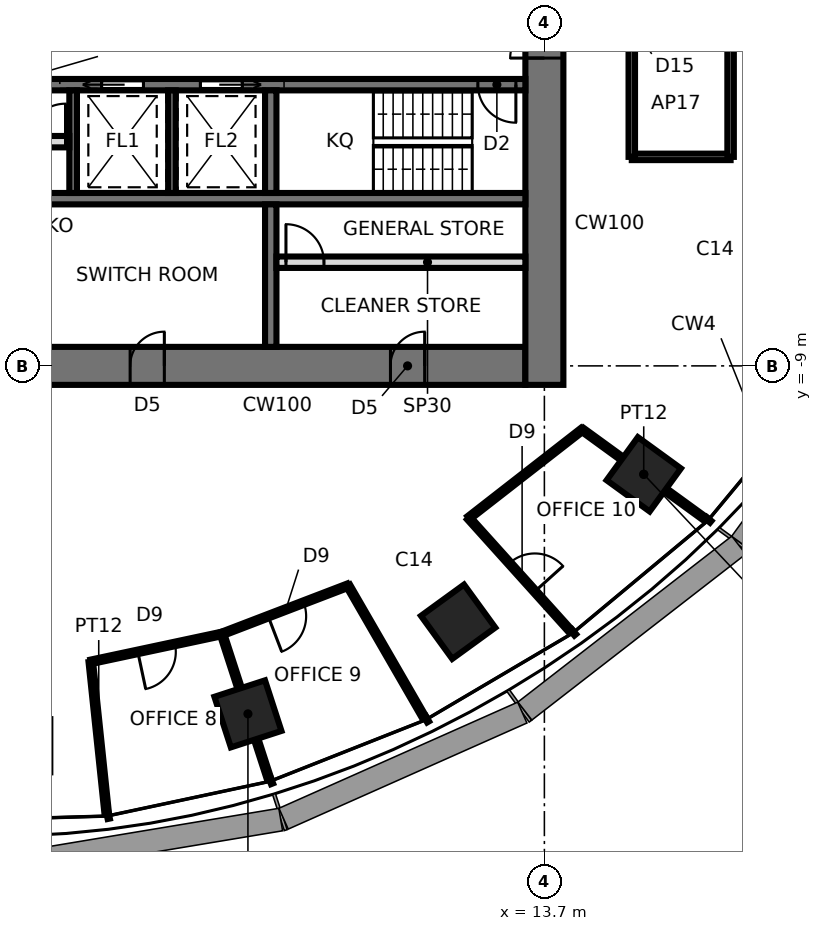
"""IFC4 building model, lengths in metres.
Left out: names, types, materials, properties, quantities, classifications, styles, units other than length and angle.
Written with IfcOpenShell. Run it as: python <this file> out.ifc"""

import sys

from ifc_helpers import new_model, si_unit, direction, frame, frame_2d, origin, origin_2d, place, context, subcontext, project, spatial, rectangle, extrude, element, fill, save


model = new_model("IFC4")
c1 = context("Model", 3, precision=1e-05, world=origin(), true_north=direction((0.0, 1.0)))
c2 = subcontext(c1, "Body", "Model", "MODEL_VIEW")
j1 = project(units=[si_unit("LENGTHUNIT", "METRE"), si_unit("PLANEANGLEUNIT", "RADIAN")], contexts=[c1])
p1 = place(None, origin())
s1 = spatial("IfcSite", under=j1, at=p1, CompositionType="ELEMENT")
p2 = place(p1, origin())
s2 = spatial("IfcBuilding", under=s1, at=p2, CompositionType="ELEMENT")
p3 = place(p2, frame((0.0, 0.0, 187.7)))
s3 = spatial("IfcBuildingStorey", under=s2, at=p3, CompositionType="ELEMENT", Elevation=187.7)
for number, where, z_axis, x_axis in (
    (1, (5.9, -18.157, 0.0), (0.0, 0.0, 1.0), (0.309, -0.951, 0.0)),
    (2, (11.43, -15.733, 0.0), (0.0, 0.0, 1.0), (0.588, -0.809, 0.0)),
    (3, (16.315, -11.854, 0.0), (0.0, 0.0, 1.0), (0.809, -0.588, 0.0)),
):
    element("IfcColumn", number, at=place(p3, frame(where, z_axis=z_axis, x_axis=x_axis)), inside=s3, PredefinedType="COLUMN", context=c2, shape_type="SweptSolid", body=[
        extrude(rectangle(XDim=1.4, YDim=1.4, at=origin_2d()), origin(), (0.0, 0.0, 1.0), 3.9),
    ])
p4 = place(p3, frame((-13.2, -9.0, 0.0), z_axis=(0.0, 0.0, 1.0), x_axis=(1.0, 0.0, 0.0)))
e4 = element("IfcWall", 4, at=p4, inside=s3, PredefinedType="SHEAR", context=c2, shape_type="SweptSolid", body=[
    extrude(rectangle(XDim=26.4, YDim=1.0, at=frame_2d((13.2, 0.0))), origin(), (0.0, 0.0, 1.0), 3.9),
])
p5 = place(p4, frame((2.65, 0.0, 0.0)))
e5 = element("IfcOpeningElement", 5, at=p5, cuts=e4, PredefinedType="OPENING", context=c2, shape_type="SweptSolid", body=[
    extrude(rectangle(XDim=0.9, YDim=2.1, at=frame_2d((0.45, 1.05))), frame((0.0, 0.51, 0.0), z_axis=(0.0, -1.0, 0.0), x_axis=(1.0, 0.0, 0.0)), (0.0, 0.0, 1.0), 1.02),
])
p6 = place(p4, frame((9.5, 0.0, 0.0)))
e6 = element("IfcOpeningElement", 6, at=p6, cuts=e4, PredefinedType="OPENING", context=c2, shape_type="SweptSolid", body=[
    extrude(rectangle(XDim=0.9, YDim=2.1, at=frame_2d((0.45, 1.05))), frame((0.0, 0.51, 0.0), z_axis=(0.0, -1.0, 0.0), x_axis=(1.0, 0.0, 0.0)), (0.0, 0.0, 1.0), 1.02),
])
p7 = place(p4, frame((16.0, 0.0, 0.0)))
e7 = element("IfcOpeningElement", 7, at=p7, cuts=e4, PredefinedType="OPENING", context=c2, shape_type="SweptSolid", body=[
    extrude(rectangle(XDim=0.9, YDim=2.1, at=frame_2d((0.45, 1.05))), frame((0.0, 0.51, 0.0), z_axis=(0.0, -1.0, 0.0), x_axis=(1.0, 0.0, 0.0)), (0.0, 0.0, 1.0), 1.02),
])
p8 = place(p4, frame((22.85, 0.0, 0.0)))
e8 = element("IfcOpeningElement", 8, at=p8, cuts=e4, PredefinedType="OPENING", context=c2, shape_type="SweptSolid", body=[
    extrude(rectangle(XDim=0.9, YDim=2.1, at=frame_2d((0.45, 1.05))), frame((0.0, 0.51, 0.0), z_axis=(0.0, -1.0, 0.0), x_axis=(1.0, 0.0, 0.0)), (0.0, 0.0, 1.0), 1.02),
])
p9 = place(p3, frame((13.7, -9.5, 0.0), z_axis=(0.0, 0.0, 1.0), x_axis=(0.0, 1.0, 0.0)))
e9 = element("IfcWall", 9, at=p9, inside=s3, PredefinedType="SHEAR", context=c2, shape_type="SweptSolid", body=[
    extrude(rectangle(XDim=19.0, YDim=1.0, at=frame_2d((9.5, 0.0))), origin(), (0.0, 0.0, 1.0), 3.9),
])
p10 = place(p9, frame((8.6, 0.0, 0.0)))
e10 = element("IfcOpeningElement", 10, at=p10, cuts=e9, PredefinedType="OPENING", context=c2, shape_type="SweptSolid", body=[
    extrude(rectangle(XDim=1.8, YDim=2.4, at=frame_2d((0.9, 1.2))), frame((0.0, 0.51, 0.0), z_axis=(0.0, -1.0, 0.0), x_axis=(1.0, 0.0, 0.0)), (0.0, 0.0, 1.0), 1.02),
])
p11 = place(p3, frame((-13.2, -1.6, 0.0), z_axis=(0.0, 0.0, 1.0), x_axis=(1.0, 0.0, 0.0)))
e11 = element("IfcWall", 11, at=p11, inside=s3, PredefinedType="SHEAR", context=c2, shape_type="SweptSolid", body=[
    extrude(rectangle(XDim=26.4, YDim=0.3, at=frame_2d((13.2, 0.0))), origin(), (0.0, 0.0, 1.0), 3.9),
])
p12 = place(p11, frame((25.15, 0.0, 0.0)))
e12 = element("IfcOpeningElement", 12, at=p12, cuts=e11, PredefinedType="OPENING", context=c2, shape_type="SweptSolid", body=[
    extrude(rectangle(XDim=1.0, YDim=2.1, at=frame_2d((0.5, 1.05))), frame((0.0, 0.16, 0.0), z_axis=(0.0, -1.0, 0.0), x_axis=(1.0, 0.0, 0.0)), (0.0, 0.0, 1.0), 0.32),
])
p13 = place(p11, frame((7.55, 0.0, 0.0)))
e13 = element("IfcOpeningElement", 13, at=p13, cuts=e11, PredefinedType="OPENING", context=c2, shape_type="SweptSolid", body=[
    extrude(rectangle(XDim=0.9, YDim=2.1, at=frame_2d((0.45, 1.05))), frame((0.0, 0.16, 0.0), z_axis=(0.0, -1.0, 0.0), x_axis=(1.0, 0.0, 0.0)), (0.0, 0.0, 1.0), 0.32),
])
p14 = place(p11, frame((9.55, 0.0, 0.0)))
e14 = element("IfcOpeningElement", 14, at=p14, cuts=e11, PredefinedType="OPENING", context=c2, shape_type="SweptSolid", body=[
    extrude(rectangle(XDim=0.9, YDim=2.1, at=frame_2d((0.45, 1.05))), frame((0.0, 0.16, 0.0), z_axis=(0.0, -1.0, 0.0), x_axis=(1.0, 0.0, 0.0)), (0.0, 0.0, 1.0), 0.32),
])
p15 = place(p11, frame((12.15, 0.0, 0.0)))
e15 = element("IfcOpeningElement", 15, at=p15, cuts=e11, PredefinedType="OPENING", context=c2, shape_type="SweptSolid", body=[
    extrude(rectangle(XDim=0.9, YDim=2.1, at=frame_2d((0.45, 1.05))), frame((0.0, 0.16, 0.0), z_axis=(0.0, -1.0, 0.0), x_axis=(1.0, 0.0, 0.0)), (0.0, 0.0, 1.0), 0.32),
])
p16 = place(p11, frame((15.25, 0.0, 0.0)))
e16 = element("IfcOpeningElement", 16, at=p16, cuts=e11, PredefinedType="OPENING", context=c2, shape_type="SweptSolid", body=[
    extrude(rectangle(XDim=1.1, YDim=2.3, at=frame_2d((0.55, 1.15))), frame((0.0, 0.16, 0.0), z_axis=(0.0, -1.0, 0.0), x_axis=(1.0, 0.0, 0.0)), (0.0, 0.0, 1.0), 0.32),
])
p17 = place(p11, frame((17.85, 0.0, 0.0)))
e17 = element("IfcOpeningElement", 17, at=p17, cuts=e11, PredefinedType="OPENING", context=c2, shape_type="SweptSolid", body=[
    extrude(rectangle(XDim=1.1, YDim=2.3, at=frame_2d((0.55, 1.15))), frame((0.0, 0.16, 0.0), z_axis=(0.0, -1.0, 0.0), x_axis=(1.0, 0.0, 0.0)), (0.0, 0.0, 1.0), 0.32),
])
p18 = place(p11, frame((4.85, 0.0, 0.0)))
e18 = element("IfcOpeningElement", 18, at=p18, cuts=e11, PredefinedType="OPENING", context=c2, shape_type="SweptSolid", body=[
    extrude(rectangle(XDim=1.1, YDim=2.3, at=frame_2d((0.55, 1.15))), frame((0.0, 0.16, 0.0), z_axis=(0.0, -1.0, 0.0), x_axis=(1.0, 0.0, 0.0)), (0.0, 0.0, 1.0), 0.32),
])
p19 = place(p11, frame((2.25, 0.0, 0.0)))
e19 = element("IfcOpeningElement", 19, at=p19, cuts=e11, PredefinedType="OPENING", context=c2, shape_type="SweptSolid", body=[
    extrude(rectangle(XDim=1.1, YDim=2.3, at=frame_2d((0.55, 1.15))), frame((0.0, 0.16, 0.0), z_axis=(0.0, -1.0, 0.0), x_axis=(1.0, 0.0, 0.0)), (0.0, 0.0, 1.0), 0.32),
])
p20 = place(p11, frame((0.35, 0.0, 0.0)))
e20 = element("IfcOpeningElement", 20, at=p20, cuts=e11, PredefinedType="OPENING", context=c2, shape_type="SweptSolid", body=[
    extrude(rectangle(XDim=0.9, YDim=2.1, at=frame_2d((0.45, 1.05))), frame((0.0, 0.16, 0.0), z_axis=(0.0, -1.0, 0.0), x_axis=(1.0, 0.0, 0.0)), (0.0, 0.0, 1.0), 0.32),
])
p21 = place(p3, frame((-13.2, -4.6, 0.0), z_axis=(0.0, 0.0, 1.0), x_axis=(1.0, 0.0, 0.0)))
e21 = element("IfcWall", 21, at=p21, inside=s3, PredefinedType="SHEAR", context=c2, shape_type="SweptSolid", body=[
    extrude(rectangle(XDim=26.4, YDim=0.3, at=frame_2d((13.2, 0.0))), origin(), (0.0, 0.0, 1.0), 3.9),
])
p22 = place(p3, frame((6.5, -1.75, 0.0), z_axis=(0.0, 0.0, 1.0), x_axis=(0.0, -1.0, 0.0)))
e22 = element("IfcWall", 22, at=p22, inside=s3, PredefinedType="SHEAR", context=c2, shape_type="SweptSolid", body=[
    extrude(rectangle(XDim=2.7, YDim=0.3, at=frame_2d((1.35, 0.0))), origin(), (0.0, 0.0, 1.0), 3.9),
])
p23 = place(p3, frame((6.5, -4.75, 0.0), z_axis=(0.0, 0.0, 1.0), x_axis=(0.0, -1.0, 0.0)))
e23 = element("IfcWall", 23, at=p23, inside=s3, PredefinedType="SHEAR", context=c2, shape_type="SweptSolid", body=[
    extrude(rectangle(XDim=3.75, YDim=0.3, at=frame_2d((1.875, 0.0))), origin(), (0.0, 0.0, 1.0), 3.9),
])
for number, where, z_axis, x_axis in (
    (24, (1.3, -1.75, 0.0), (0.0, 0.0, 1.0), (0.0, -1.0, 0.0)),
    (25, (3.9, -1.75, 0.0), (0.0, 0.0, 1.0), (0.0, -1.0, 0.0)),
):
    element("IfcWall", number, at=place(p3, frame(where, z_axis=z_axis, x_axis=x_axis)), inside=s3, PredefinedType="SHEAR", context=c2, shape_type="SweptSolid", body=[
        extrude(rectangle(XDim=2.7, YDim=0.2, at=frame_2d((1.35, 0.0))), origin(), (0.0, 0.0, 1.0), 3.9),
    ])
p24 = place(p3, frame((-1.2, -3.1, 0.0), z_axis=(0.0, 0.0, 1.0), x_axis=(1.0, 0.0, 0.0)))
e26 = element("IfcWall", 26, at=p24, inside=s3, PredefinedType="PARTITIONING", context=c2, shape_type="SweptSolid", body=[
    extrude(rectangle(XDim=2.4, YDim=0.3, at=frame_2d((1.2, 0.0))), origin(), (0.0, 0.0, 1.0), 3.74),
])
p25 = place(p24, frame((1.3, 0.0, 0.0)))
e27 = element("IfcOpeningElement", 27, at=p25, cuts=e26, PredefinedType="OPENING", context=c2, shape_type="SweptSolid", body=[
    extrude(rectangle(XDim=1.0, YDim=2.4, at=frame_2d((0.5, 1.2))), frame((0.0, 0.16, 0.0), z_axis=(0.0, -1.0, 0.0), x_axis=(1.0, 0.0, 0.0)), (0.0, 0.0, 1.0), 0.32),
])
p26 = place(p3, frame((6.65, -6.272, 0.0), z_axis=(0.0, 0.0, 1.0), x_axis=(1.0, 0.0, 0.0)))
e28 = element("IfcWall", 28, at=p26, inside=s3, PredefinedType="PARTITIONING", context=c2, shape_type="SweptSolid", body=[
    extrude(rectangle(XDim=6.55, YDim=0.3, at=frame_2d((3.275, 0.0))), origin(), (0.0, 0.0, 1.0), 3.74),
])
p27 = place(p26, frame((0.25, 0.0, 0.0)))
e29 = element("IfcOpeningElement", 29, at=p27, cuts=e28, PredefinedType="OPENING", context=c2, shape_type="SweptSolid", body=[
    extrude(rectangle(XDim=1.0, YDim=2.4, at=frame_2d((0.5, 1.2))), frame((0.0, 0.16, 0.0), z_axis=(0.0, -1.0, 0.0), x_axis=(1.0, 0.0, 0.0)), (0.0, 0.0, 1.0), 0.32),
])
p28 = place(p3, frame((1.765, -16.789, 0.0), z_axis=(0.0, 0.0, 1.0), x_axis=(0.104494148666, -0.99452550138, 0.0)))
e30 = element("IfcWall", 30, at=p28, inside=s3, PredefinedType="PARTITIONING", context=c2, shape_type="SweptSolid", body=[
    extrude(rectangle(XDim=4.0, YDim=0.12, at=frame_2d((2.0, 0.0))), origin(), (0.0, 0.0, 1.0), 3.74),
])
p29 = place(p3, frame((5.216, -16.053, 0.0), z_axis=(0.0, 0.0, 1.0), x_axis=(-0.978033661385, -0.208447012927, 0.0)))
e31 = element("IfcWall", 31, at=p29, inside=s3, PredefinedType="PARTITIONING", context=c2, shape_type="SweptSolid", body=[
    extrude(rectangle(XDim=3.529, YDim=0.12, at=frame_2d((1.765, 0.0))), origin(), (0.0, 0.0, 1.0), 3.74),
])
p30 = place(p29, frame((1.264, 0.0, 0.0)))
e32 = element("IfcOpeningElement", 32, at=p30, cuts=e31, PredefinedType="OPENING", context=c2, shape_type="SweptSolid", body=[
    extrude(rectangle(XDim=1.0, YDim=2.4, at=frame_2d((0.5, 1.2))), frame((0.0, 0.07, 0.0), z_axis=(0.0, -1.0, 0.0), x_axis=(1.0, 0.0, 0.0)), (0.0, 0.0, 1.0), 0.14),
])
p31 = place(p3, frame((5.216, -16.053, 0.0), z_axis=(0.0, 0.0, 1.0), x_axis=(0.309022586479, -0.951054699292, 0.0)))
e33 = element("IfcWall", 33, at=p31, inside=s3, PredefinedType="PARTITIONING", context=c2, shape_type="SweptSolid", body=[
    extrude(rectangle(XDim=4.0, YDim=0.12, at=frame_2d((2.0, 0.0))), origin(), (0.0, 0.0, 1.0), 3.04),
])
p32 = place(p3, frame((8.534, -14.782, 0.0), z_axis=(0.0, 0.0, 1.0), x_axis=(-0.933789357777, -0.357823190001, 0.0)))
e34 = element("IfcWall", 34, at=p32, inside=s3, PredefinedType="PARTITIONING", context=c2, shape_type="SweptSolid", body=[
    extrude(rectangle(XDim=3.553, YDim=0.12, at=frame_2d((1.777, 0.0))), origin(), (0.0, 0.0, 1.0), 3.74),
])
p33 = place(p32, frame((1.252, 0.0, 0.0)))
e35 = element("IfcOpeningElement", 35, at=p33, cuts=e34, PredefinedType="OPENING", context=c2, shape_type="SweptSolid", body=[
    extrude(rectangle(XDim=1.0, YDim=2.4, at=frame_2d((0.5, 1.2))), frame((0.0, 0.07, 0.0), z_axis=(0.0, -1.0, 0.0), x_axis=(1.0, 0.0, 0.0)), (0.0, 0.0, 1.0), 0.14),
])
p34 = place(p3, frame((10.534, -18.246, 0.0), z_axis=(0.0, 0.0, 1.0), x_axis=(-0.49999894854, 0.866026010844, 0.0)))
e36 = element("IfcWall", 36, at=p34, inside=s3, PredefinedType="PARTITIONING", context=c2, shape_type="SweptSolid", body=[
    extrude(rectangle(XDim=4.0, YDim=0.12, at=frame_2d((2.0, 0.0))), origin(), (0.0, 0.0, 1.0), 3.74),
])
p35 = place(p3, frame((11.709, -13.004, 0.0), z_axis=(0.0, 0.0, 1.0), x_axis=(0.669150182773, -0.743127198328, 0.0)))
e37 = element("IfcWall", 37, at=p35, inside=s3, PredefinedType="PARTITIONING", context=c2, shape_type="SweptSolid", body=[
    extrude(rectangle(XDim=4.0, YDim=0.12, at=frame_2d((2.0, 0.0))), origin(), (0.0, 0.0, 1.0), 3.74),
])
p36 = place(p35, frame((1.6, 0.0, 0.0)))
e38 = element("IfcOpeningElement", 38, at=p36, cuts=e37, PredefinedType="OPENING", context=c2, shape_type="SweptSolid", body=[
    extrude(rectangle(XDim=1.0, YDim=2.4, at=frame_2d((0.5, 1.2))), frame((0.0, 0.07, 0.0), z_axis=(0.0, -1.0, 0.0), x_axis=(1.0, 0.0, 0.0)), (0.0, 0.0, 1.0), 0.14),
])
p37 = place(p3, frame((14.696, -10.677, 0.0), z_axis=(0.0, 0.0, 1.0), x_axis=(-0.788973621164, -0.614427070617, 0.0)))
e39 = element("IfcWall", 39, at=p37, inside=s3, PredefinedType="PARTITIONING", context=c2, shape_type="SweptSolid", body=[
    extrude(rectangle(XDim=3.786, YDim=0.12, at=frame_2d((1.893, 0.0))), origin(), (0.0, 0.0, 1.0), 3.74),
])
p38 = place(p3, frame((17.932, -13.029, 0.0), z_axis=(0.0, 0.0, 1.0), x_axis=(-0.809026317077, 0.587772420479, 0.0)))
e40 = element("IfcWall", 40, at=p38, inside=s3, PredefinedType="PARTITIONING", context=c2, shape_type="SweptSolid", body=[
    extrude(rectangle(XDim=4.0, YDim=0.12, at=frame_2d((2.0, 0.0))), origin(), (0.0, 0.0, 1.0), 3.04),
])
p39 = place(p3, frame((18.6, -3.5, 0.0), z_axis=(0.0, 0.0, 1.0), x_axis=(-1.0, 0.0, 0.0)))
e41 = element("IfcWall", 41, at=p39, inside=s3, PredefinedType="PARTITIONING", context=c2, shape_type="SweptSolid", body=[
    extrude(rectangle(XDim=2.6, YDim=0.17, at=frame_2d((1.3, 0.0))), origin(), (0.0, 0.0, 1.0), 3.74),
])
p40 = place(p3, frame((16.0, -3.5, 0.0), z_axis=(0.0, 0.0, 1.0), x_axis=(0.0, 1.0, 0.0)))
e42 = element("IfcWall", 42, at=p40, inside=s3, PredefinedType="PARTITIONING", context=c2, shape_type="SweptSolid", body=[
    extrude(rectangle(XDim=7.0, YDim=0.17, at=frame_2d((3.5, 0.0))), origin(), (0.0, 0.0, 1.0), 3.74),
])
p41 = place(p40, frame((2.95, 0.0, 0.0)))
e43 = element("IfcOpeningElement", 43, at=p41, cuts=e42, PredefinedType="OPENING", context=c2, shape_type="SweptSolid", body=[
    extrude(rectangle(XDim=1.1, YDim=2.4, at=frame_2d((0.55, 1.2))), frame((0.0, 0.095, 0.0), z_axis=(0.0, -1.0, 0.0), x_axis=(1.0, 0.0, 0.0)), (0.0, 0.0, 1.0), 0.19),
])
p42 = place(p3, frame((18.6, 3.5, 0.0), z_axis=(0.0, 0.0, 1.0), x_axis=(0.0, -1.0, 0.0)))
e44 = element("IfcWall", 44, at=p42, inside=s3, PredefinedType="PARTITIONING", context=c2, shape_type="SweptSolid", body=[
    extrude(rectangle(XDim=7.0, YDim=0.17, at=frame_2d((3.5, 0.0))), origin(), (0.0, 0.0, 1.0), 3.334),
])
p43 = place(p10, origin())
e45 = element("IfcDoor", 45, at=p43, inside=s3, OperationType="DOUBLE_DOOR_SINGLE_SWING", PredefinedType="DOOR", context=c2, shape_type="SweptSolid", body=[
    extrude(rectangle(XDim=1.72, YDim=2.36, at=frame_2d((0.9, 1.18))), frame((0.0, 0.025, 0.0), z_axis=(0.0, -1.0, 0.0), x_axis=(1.0, 0.0, 0.0)), (0.0, 0.0, 1.0), 0.05),
    extrude(rectangle(XDim=0.04, YDim=2.4, at=frame_2d((0.02, 1.2))), frame((0.0, 0.25, 0.0), z_axis=(0.0, -1.0, 0.0), x_axis=(1.0, 0.0, 0.0)), (0.0, 0.0, 1.0), 0.5),
    extrude(rectangle(XDim=0.04, YDim=2.4, at=frame_2d((1.78, 1.2))), frame((0.0, 0.25, 0.0), z_axis=(0.0, -1.0, 0.0), x_axis=(1.0, 0.0, 0.0)), (0.0, 0.0, 1.0), 0.5),
    extrude(rectangle(XDim=1.72, YDim=0.04, at=frame_2d((0.9, 2.38))), frame((0.0, 0.25, 0.0), z_axis=(0.0, -1.0, 0.0), x_axis=(1.0, 0.0, 0.0)), (0.0, 0.0, 1.0), 0.5),
])
fill(e10, e45)
p44 = place(p12, frame((1.0, 0.0, 0.0), z_axis=(0.0, 0.0, 1.0), x_axis=(-1.0, 0.0, 0.0)))
e46 = element("IfcDoor", 46, at=p44, inside=s3, OperationType="SINGLE_SWING_LEFT", PredefinedType="DOOR", context=c2, shape_type="SweptSolid", body=[
    extrude(rectangle(XDim=1.0, YDim=2.1, at=frame_2d((0.5, 1.05))), frame((0.0, 0.025, 0.0), z_axis=(0.0, -1.0, 0.0), x_axis=(1.0, 0.0, 0.0)), (0.0, 0.0, 1.0), 0.05),
])
fill(e12, e46)
p45 = place(p25, origin())
e47 = element("IfcDoor", 47, at=p45, inside=s3, OperationType="SINGLE_SWING_RIGHT", PredefinedType="DOOR", context=c2, shape_type="SweptSolid", body=[
    extrude(rectangle(XDim=1.0, YDim=2.4, at=frame_2d((0.5, 1.2))), frame((0.0, 0.025, 0.0), z_axis=(0.0, -1.0, 0.0), x_axis=(1.0, 0.0, 0.0)), (0.0, 0.0, 1.0), 0.05),
])
fill(e27, e47)
p46 = place(p16, frame((1.1, 0.0, 0.0), z_axis=(0.0, 0.0, 1.0), x_axis=(-1.0, 0.0, 0.0)))
e48 = element("IfcDoor", 48, at=p46, inside=s3, OperationType="SLIDING_TO_RIGHT", PredefinedType="DOOR", context=c2, shape_type="SweptSolid", body=[
    extrude(rectangle(XDim=1.1, YDim=2.3, at=frame_2d((0.55, 1.15))), frame((0.0, 0.025, 0.0), z_axis=(0.0, -1.0, 0.0), x_axis=(1.0, 0.0, 0.0)), (0.0, 0.0, 1.0), 0.05),
])
fill(e16, e48)
p47 = place(p17, frame((1.1, 0.0, 0.0), z_axis=(0.0, 0.0, 1.0), x_axis=(-1.0, 0.0, 0.0)))
e49 = element("IfcDoor", 49, at=p47, inside=s3, OperationType="SLIDING_TO_LEFT", PredefinedType="DOOR", context=c2, shape_type="SweptSolid", body=[
    extrude(rectangle(XDim=1.1, YDim=2.3, at=frame_2d((0.55, 1.15))), frame((0.0, 0.025, 0.0), z_axis=(0.0, -1.0, 0.0), x_axis=(1.0, 0.0, 0.0)), (0.0, 0.0, 1.0), 0.05),
])
fill(e17, e49)
p48 = place(p7, origin())
e50 = element("IfcDoor", 50, at=p48, inside=s3, OperationType="SINGLE_SWING_RIGHT", PredefinedType="DOOR", context=c2, shape_type="SweptSolid", body=[
    extrude(rectangle(XDim=0.82, YDim=2.06, at=frame_2d((0.45, 1.03))), frame((0.0, 0.025, 0.0), z_axis=(0.0, -1.0, 0.0), x_axis=(1.0, 0.0, 0.0)), (0.0, 0.0, 1.0), 0.05),
    extrude(rectangle(XDim=0.04, YDim=2.1, at=frame_2d((0.02, 1.05))), frame((0.0, 0.25, 0.0), z_axis=(0.0, -1.0, 0.0), x_axis=(1.0, 0.0, 0.0)), (0.0, 0.0, 1.0), 0.5),
    extrude(rectangle(XDim=0.04, YDim=2.1, at=frame_2d((0.88, 1.05))), frame((0.0, 0.25, 0.0), z_axis=(0.0, -1.0, 0.0), x_axis=(1.0, 0.0, 0.0)), (0.0, 0.0, 1.0), 0.5),
    extrude(rectangle(XDim=0.82, YDim=0.04, at=frame_2d((0.45, 2.08))), frame((0.0, 0.25, 0.0), z_axis=(0.0, -1.0, 0.0), x_axis=(1.0, 0.0, 0.0)), (0.0, 0.0, 1.0), 0.5),
])
fill(e7, e50)
p49 = place(p8, origin())
e51 = element("IfcDoor", 51, at=p49, inside=s3, OperationType="SINGLE_SWING_RIGHT", PredefinedType="DOOR", context=c2, shape_type="SweptSolid", body=[
    extrude(rectangle(XDim=0.82, YDim=2.06, at=frame_2d((0.45, 1.03))), frame((0.0, 0.025, 0.0), z_axis=(0.0, -1.0, 0.0), x_axis=(1.0, 0.0, 0.0)), (0.0, 0.0, 1.0), 0.05),
    extrude(rectangle(XDim=0.04, YDim=2.1, at=frame_2d((0.02, 1.05))), frame((0.0, 0.25, 0.0), z_axis=(0.0, -1.0, 0.0), x_axis=(1.0, 0.0, 0.0)), (0.0, 0.0, 1.0), 0.5),
    extrude(rectangle(XDim=0.04, YDim=2.1, at=frame_2d((0.88, 1.05))), frame((0.0, 0.25, 0.0), z_axis=(0.0, -1.0, 0.0), x_axis=(1.0, 0.0, 0.0)), (0.0, 0.0, 1.0), 0.5),
    extrude(rectangle(XDim=0.82, YDim=0.04, at=frame_2d((0.45, 2.08))), frame((0.0, 0.25, 0.0), z_axis=(0.0, -1.0, 0.0), x_axis=(1.0, 0.0, 0.0)), (0.0, 0.0, 1.0), 0.5),
])
fill(e8, e51)
p50 = place(p27, origin())
e52 = element("IfcDoor", 52, at=p50, inside=s3, OperationType="SINGLE_SWING_LEFT", PredefinedType="DOOR", context=c2, shape_type="SweptSolid", body=[
    extrude(rectangle(XDim=1.0, YDim=2.4, at=frame_2d((0.5, 1.2))), frame((0.0, 0.025, 0.0), z_axis=(0.0, -1.0, 0.0), x_axis=(1.0, 0.0, 0.0)), (0.0, 0.0, 1.0), 0.05),
])
fill(e29, e52)
p51 = place(p30, origin())
e53 = element("IfcDoor", 53, at=p51, inside=s3, OperationType="SINGLE_SWING_RIGHT", PredefinedType="DOOR", context=c2, shape_type="SweptSolid", body=[
    extrude(rectangle(XDim=1.0, YDim=2.4, at=frame_2d((0.5, 1.2))), frame((0.0, 0.025, 0.0), z_axis=(0.0, -1.0, 0.0), x_axis=(1.0, 0.0, 0.0)), (0.0, 0.0, 1.0), 0.05),
])
fill(e32, e53)
p52 = place(p33, origin())
e54 = element("IfcDoor", 54, at=p52, inside=s3, OperationType="SINGLE_SWING_RIGHT", PredefinedType="DOOR", context=c2, shape_type="SweptSolid", body=[
    extrude(rectangle(XDim=1.0, YDim=2.4, at=frame_2d((0.5, 1.2))), frame((0.0, 0.025, 0.0), z_axis=(0.0, -1.0, 0.0), x_axis=(1.0, 0.0, 0.0)), (0.0, 0.0, 1.0), 0.05),
])
fill(e35, e54)
p53 = place(p36, origin())
e55 = element("IfcDoor", 55, at=p53, inside=s3, OperationType="SINGLE_SWING_RIGHT", PredefinedType="DOOR", context=c2, shape_type="SweptSolid", body=[
    extrude(rectangle(XDim=1.0, YDim=2.4, at=frame_2d((0.5, 1.2))), frame((0.0, 0.025, 0.0), z_axis=(0.0, -1.0, 0.0), x_axis=(1.0, 0.0, 0.0)), (0.0, 0.0, 1.0), 0.05),
])
fill(e38, e55)
save(model, sys.argv[1])
